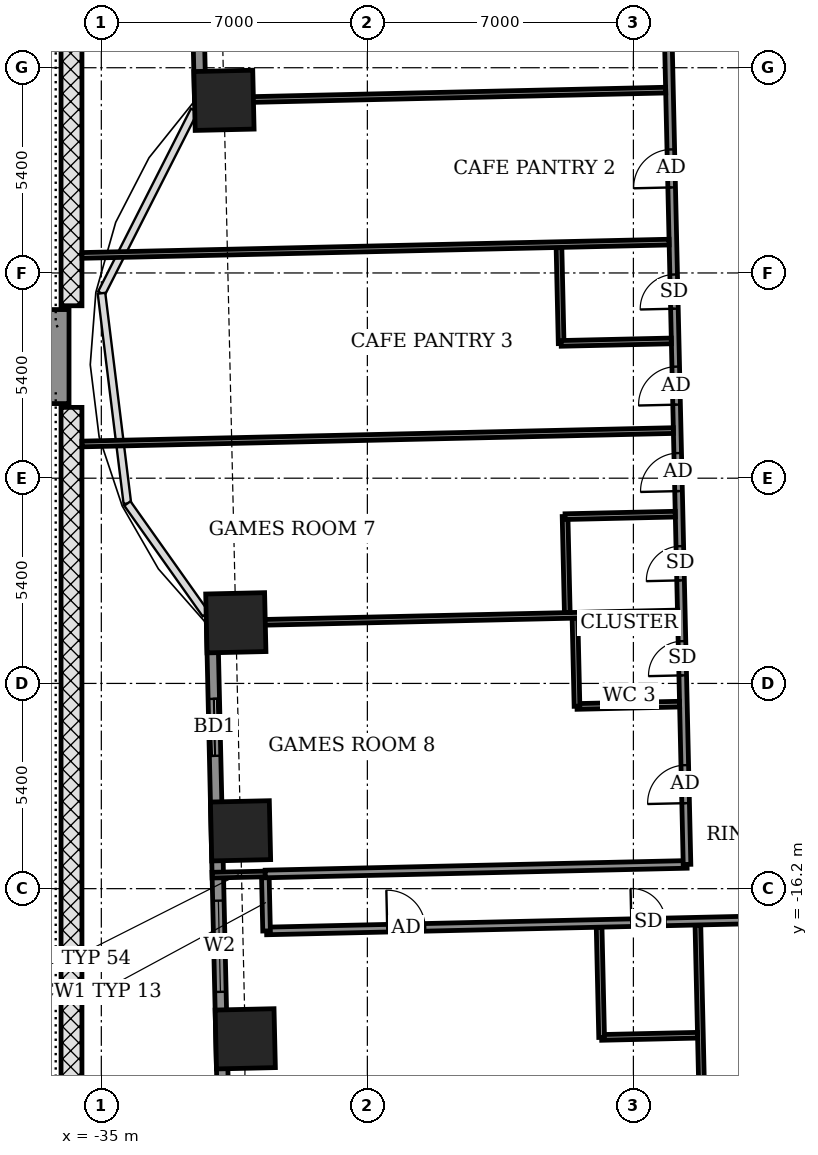
"""IFC4 building model, lengths in metres.
Left out: names, types, materials, properties, quantities, classifications, styles, units other than length and angle.
Written with IfcOpenShell. Run it as: python <this file> out.ifc"""

import sys

from ifc_helpers import new_model, si_unit, direction, frame, frame_2d, origin, origin_2d, place, context, subcontext, project, spatial, rectangle, extrude, element, fill, save


model = new_model("IFC4")
c1 = context("Model", 3, precision=1e-05, world=origin(), true_north=direction((0.0, 1.0)))
c2 = subcontext(c1, "Body", "Model", "MODEL_VIEW")
j1 = project(units=[si_unit("LENGTHUNIT", "METRE"), si_unit("PLANEANGLEUNIT", "RADIAN")], contexts=[c1])
p1 = place(None, origin())
s1 = spatial("IfcSite", under=j1, at=p1, CompositionType="ELEMENT")
p2 = place(p1, origin())
s2 = spatial("IfcBuilding", under=s1, at=p2, CompositionType="ELEMENT")
p3 = place(p2, frame((0.0, 0.0, 29.5)))
s3 = spatial("IfcBuildingStorey", under=s2, at=p3, CompositionType="ELEMENT", Elevation=29.5)
for number, where, z_axis, x_axis in (
    (1, (-31.461, -9.204, -0.55), (0.0, 0.0, 1.0), (0.023, -1.0, 0.0)),
    (2, (-31.337, -14.678, -0.55), (0.0, 0.0, 1.0), (0.023, -1.0, 0.0)),
    (3, (-31.213, -20.151, -0.55), (0.0, 0.0, 1.0), (0.023, -1.0, 0.0)),
    (4, (-31.773, 4.542, -0.55), (0.0, 0.0, 1.0), (0.023, -1.0, 0.0)),
):
    element("IfcColumn", number, at=place(p3, frame(where, z_axis=z_axis, x_axis=x_axis)), inside=s3, PredefinedType="COLUMN", context=c2, shape_type="SweptSolid", body=[
        extrude(rectangle(XDim=1.55, YDim=1.55, at=origin_2d()), origin(), (0.0, 0.0, 1.0), 4.6),
    ])
p4 = place(p3, frame((-32.758, 20.399, 0.0), z_axis=(0.0, 0.0, 1.0), x_axis=(0.022668485183, -0.999743036875, 0.0)))
e5 = element("IfcWall", 5, at=p4, inside=s3, PredefinedType="SOLIDWALL", context=c2, shape_type="SweptSolid", body=[
    extrude(rectangle(XDim=15.929, YDim=0.3, at=frame_2d((7.964, 0.0))), origin(), (0.0, 0.0, 1.0), 4.05),
])
p5 = place(p4, frame((2.183, 0.0, 0.0)))
e6 = element("IfcOpeningElement", 6, at=p5, cuts=e5, PredefinedType="OPENING", context=c2, shape_type="SweptSolid", body=[
    extrude(rectangle(XDim=1.5, YDim=2.4, at=frame_2d((0.75, 1.2))), frame((0.0, 0.16, 0.0), z_axis=(0.0, -1.0, 0.0), x_axis=(1.0, 0.0, 0.0)), (0.0, 0.0, 1.0), 0.32),
])
p6 = place(p4, frame((12.004, 0.0, 0.9)))
e7 = element("IfcOpeningElement", 7, at=p6, cuts=e5, PredefinedType="OPENING", context=c2, shape_type="SweptSolid", body=[
    extrude(rectangle(XDim=2.4, YDim=1.5, at=frame_2d((1.2, 0.75))), frame((0.0, 0.16, 0.0), z_axis=(0.0, -1.0, 0.0), x_axis=(1.0, 0.0, 0.0)), (0.0, 0.0, 1.0), 0.32),
])
p7 = place(p3, frame((-32.087, -9.164, 0.0), z_axis=(0.0, 0.0, 1.0), x_axis=(0.022651102902, -0.999743430855, 0.0)))
e8 = element("IfcWall", 8, at=p7, inside=s3, PredefinedType="SOLIDWALL", context=c2, shape_type="SweptSolid", body=[
    extrude(rectangle(XDim=16.329, YDim=0.3, at=frame_2d((8.165, 0.0))), origin(), (0.0, 0.0, 1.0), 4.05),
])
p8 = place(p7, frame((2.042, 0.0, 0.0)))
e9 = element("IfcOpeningElement", 9, at=p8, cuts=e8, PredefinedType="OPENING", context=c2, shape_type="SweptSolid", body=[
    extrude(rectangle(XDim=1.5, YDim=2.4, at=frame_2d((0.75, 1.2))), frame((0.0, 0.16, 0.0), z_axis=(0.0, -1.0, 0.0), x_axis=(1.0, 0.0, 0.0)), (0.0, 0.0, 1.0), 0.32),
])
p9 = place(p7, frame((7.354, 0.0, 0.9)))
e10 = element("IfcOpeningElement", 10, at=p9, cuts=e8, PredefinedType="OPENING", context=c2, shape_type="SweptSolid", body=[
    extrude(rectangle(XDim=2.4, YDim=1.5, at=frame_2d((1.2, 0.75))), frame((0.0, 0.16, 0.0), z_axis=(0.0, -1.0, 0.0), x_axis=(1.0, 0.0, 0.0)), (0.0, 0.0, 1.0), 0.32),
])
p10 = place(p3, frame((-33.464, -12.375, 0.0), z_axis=(0.0, 0.0, 1.0), x_axis=(-0.022929749512, 0.99973707873, 0.0)))
e11 = element("IfcWall", 11, at=p10, inside=s3, PredefinedType="USERDEFINED", context=c2, shape_type="SweptSolid", body=[
    extrude(rectangle(XDim=2.875, YDim=0.55, at=frame_2d((1.438, 0.0))), origin(), (0.0, 0.0, 1.0), 0.8),
])
p11 = place(p3, frame((-35.785, -22.443, 0.0), z_axis=(0.0, 0.0, 1.0), x_axis=(0.0, 1.0, 0.0)))
e12 = element("IfcWall", 12, at=p11, inside=s3, PredefinedType="USERDEFINED", context=c2, shape_type="SweptSolid", body=[
    extrude(rectangle(XDim=18.906, YDim=0.55, at=frame_2d((9.453, 0.0))), origin(), (0.0, 0.0, 1.0), 0.8),
])
p12 = place(p3, frame((-35.785, -0.863, 0.0), z_axis=(0.0, 0.0, 1.0), x_axis=(0.0, 1.0, 0.0)))
e13 = element("IfcWall", 13, at=p12, inside=s3, PredefinedType="USERDEFINED", context=c2, shape_type="SweptSolid", body=[
    extrude(rectangle(XDim=23.306, YDim=0.55, at=frame_2d((11.653, 0.0))), origin(), (0.0, 0.0, 1.0), 0.8),
])
p13 = place(p3, frame((-36.2, -0.963, 0.0), z_axis=(0.0, 0.0, 1.0), x_axis=(0.0, -1.0, 0.0)))
e14 = element("IfcWall", 14, at=p13, inside=s3, PredefinedType="STANDARD", context=c2, shape_type="SweptSolid", body=[
    extrude(rectangle(XDim=2.474, YDim=0.7, at=frame_2d((1.237, 0.0))), origin(), (0.0, 0.0, 1.0), 0.55),
])
p14 = place(p3, frame((-19.021, -29.552, 0.0), z_axis=(0.0, 0.0, 1.0), x_axis=(-0.022741979748, 0.999741367733, 0.0)))
e15 = element("IfcWall", 15, at=p14, inside=s3, PredefinedType="PARTITIONING", context=c2, shape_type="SweptSolid", body=[
    extrude(rectangle(XDim=12.399, YDim=0.15, at=frame_2d((6.2, 0.0))), origin(), (0.0, 0.0, 1.0), 3.55),
])
p15 = place(p3, frame((-21.836, -20.114, 0.0), z_axis=(0.0, 0.0, 1.0), x_axis=(0.99974392816, 0.022629142889, 0.0)))
e16 = element("IfcWall", 16, at=p15, inside=s3, PredefinedType="PARTITIONING", context=c2, shape_type="SweptSolid", body=[
    extrude(rectangle(XDim=2.525, YDim=0.15, at=frame_2d((1.262, 0.0))), origin(), (0.0, 0.0, 1.0), 4.05),
])
p16 = place(p3, frame((-21.836, -20.114, 0.0), z_axis=(0.0, 0.0, 1.0), x_axis=(-0.022817032779, 0.999739657619, 0.0)))
e17 = element("IfcWall", 17, at=p16, inside=s3, PredefinedType="PARTITIONING", context=c2, shape_type="SweptSolid", body=[
    extrude(rectangle(XDim=2.9, YDim=0.15, at=frame_2d((1.45, 0.0))), origin(), (0.0, 0.0, 1.0), 4.05),
])
p17 = place(p3, frame((-30.652, -17.313, 0.0), z_axis=(0.0, 0.0, 1.0), x_axis=(0.999742623764, 0.02268669719, 0.0)))
e18 = element("IfcWall", 18, at=p17, inside=s3, PredefinedType="PARTITIONING", context=c2, shape_type="SweptSolid", body=[
    extrude(rectangle(XDim=58.8, YDim=0.2, at=frame_2d((29.4, 0.0))), origin(), (0.0, 0.0, 1.0), 4.05),
])
p18 = place(p17, frame((3.175, 0.0, 0.0)))
e19 = element("IfcOpeningElement", 19, at=p18, cuts=e18, PredefinedType="OPENING", context=c2, shape_type="SweptSolid", body=[
    extrude(rectangle(XDim=1.0, YDim=2.1, at=frame_2d((0.5, 1.05))), frame((0.0, 0.11, 0.0), z_axis=(0.0, -1.0, 0.0), x_axis=(1.0, 0.0, 0.0)), (0.0, 0.0, 1.0), 0.22),
])
p19 = place(p17, frame((9.6, 0.0, 0.0)))
e20 = element("IfcOpeningElement", 20, at=p19, cuts=e18, PredefinedType="OPENING", context=c2, shape_type="SweptSolid", body=[
    extrude(rectangle(XDim=0.9, YDim=2.1, at=frame_2d((0.45, 1.05))), frame((0.0, 0.11, 0.0), z_axis=(0.0, -1.0, 0.0), x_axis=(1.0, 0.0, 0.0)), (0.0, 0.0, 1.0), 0.22),
])
p20 = place(p17, frame((14.675, 0.0, 0.0)))
e21 = element("IfcOpeningElement", 21, at=p20, cuts=e18, PredefinedType="OPENING", context=c2, shape_type="SweptSolid", body=[
    extrude(rectangle(XDim=1.0, YDim=2.1, at=frame_2d((0.5, 1.05))), frame((0.0, 0.11, 0.0), z_axis=(0.0, -1.0, 0.0), x_axis=(1.0, 0.0, 0.0)), (0.0, 0.0, 1.0), 0.22),
])
p21 = place(p17, frame((19.85, 0.0, 0.0)))
e22 = element("IfcOpeningElement", 22, at=p21, cuts=e18, PredefinedType="OPENING", context=c2, shape_type="SweptSolid", body=[
    extrude(rectangle(XDim=0.9, YDim=2.1, at=frame_2d((0.45, 1.05))), frame((0.0, 0.11, 0.0), z_axis=(0.0, -1.0, 0.0), x_axis=(1.0, 0.0, 0.0)), (0.0, 0.0, 1.0), 0.22),
])
p22 = place(p17, frame((27.25, 0.0, 0.0)))
e23 = element("IfcOpeningElement", 23, at=p22, cuts=e18, PredefinedType="OPENING", context=c2, shape_type="SweptSolid", body=[
    extrude(rectangle(XDim=0.9, YDim=2.1, at=frame_2d((0.45, 1.05))), frame((0.0, 0.11, 0.0), z_axis=(0.0, -1.0, 0.0), x_axis=(1.0, 0.0, 0.0)), (0.0, 0.0, 1.0), 0.22),
])
p23 = place(p17, frame((29.85, 0.0, 0.0)))
e24 = element("IfcOpeningElement", 24, at=p23, cuts=e18, PredefinedType="OPENING", context=c2, shape_type="SweptSolid", body=[
    extrude(rectangle(XDim=0.9, YDim=2.1, at=frame_2d((0.45, 1.05))), frame((0.0, 0.11, 0.0), z_axis=(0.0, -1.0, 0.0), x_axis=(1.0, 0.0, 0.0)), (0.0, 0.0, 1.0), 0.22),
])
p24 = place(p17, frame((37.275, 0.0, 0.0)))
e25 = element("IfcOpeningElement", 25, at=p24, cuts=e18, PredefinedType="OPENING", context=c2, shape_type="SweptSolid", body=[
    extrude(rectangle(XDim=0.9, YDim=2.1, at=frame_2d((0.45, 1.05))), frame((0.0, 0.11, 0.0), z_axis=(0.0, -1.0, 0.0), x_axis=(1.0, 0.0, 0.0)), (0.0, 0.0, 1.0), 0.22),
])
p25 = place(p17, frame((41.625, 0.0, 0.0)))
e26 = element("IfcOpeningElement", 26, at=p25, cuts=e18, PredefinedType="OPENING", context=c2, shape_type="SweptSolid", body=[
    extrude(rectangle(XDim=1.0, YDim=2.1, at=frame_2d((0.5, 1.05))), frame((0.0, 0.11, 0.0), z_axis=(0.0, -1.0, 0.0), x_axis=(1.0, 0.0, 0.0)), (0.0, 0.0, 1.0), 0.22),
])
p26 = place(p17, frame((45.95, 0.0, 0.0)))
e27 = element("IfcOpeningElement", 27, at=p26, cuts=e18, PredefinedType="OPENING", context=c2, shape_type="SweptSolid", body=[
    extrude(rectangle(XDim=0.9, YDim=2.1, at=frame_2d((0.45, 1.05))), frame((0.0, 0.11, 0.0), z_axis=(0.0, -1.0, 0.0), x_axis=(1.0, 0.0, 0.0)), (0.0, 0.0, 1.0), 0.22),
])
p27 = place(p17, frame((52.782, 0.0, 0.0)))
e28 = element("IfcOpeningElement", 28, at=p27, cuts=e18, PredefinedType="OPENING", context=c2, shape_type="SweptSolid", body=[
    extrude(rectangle(XDim=1.0, YDim=2.1, at=frame_2d((0.5, 1.05))), frame((0.0, 0.11, 0.0), z_axis=(0.0, -1.0, 0.0), x_axis=(1.0, 0.0, 0.0)), (0.0, 0.0, 1.0), 0.22),
])
p28 = place(p3, frame((-30.652, -17.313, 0.0), z_axis=(0.0, 0.0, 1.0), x_axis=(-0.022632637625, 0.99974384905, 0.0)))
e29 = element("IfcWall", 29, at=p28, inside=s3, PredefinedType="PARTITIONING", context=c2, shape_type="SweptSolid", body=[
    extrude(rectangle(XDim=1.5, YDim=0.2, at=frame_2d((0.75, 0.0))), origin(), (0.0, 0.0, 1.0), 4.05),
])
p29 = place(p3, frame((-32.086, -15.845, 0.0), z_axis=(0.0, 0.0, 1.0), x_axis=(0.999754810245, 0.022143156767, 0.0)))
e30 = element("IfcWall", 30, at=p29, inside=s3, PredefinedType="PARTITIONING", context=c2, shape_type="SweptSolid", body=[
    extrude(rectangle(XDim=1.4, YDim=0.15, at=frame_2d((0.7, 0.0))), origin(), (0.0, 0.0, 1.0), 3.55),
])
p30 = place(p3, frame((-30.686, -15.814, 0.0), z_axis=(0.0, 0.0, 1.0), x_axis=(0.999742346277, 0.022698921993, 0.0)))
e31 = element("IfcWall", 31, at=p30, inside=s3, PredefinedType="PARTITIONING", context=c2, shape_type="SweptSolid", body=[
    extrude(rectangle(XDim=11.1, YDim=0.2, at=frame_2d((5.55, 0.0))), origin(), (0.0, 0.0, 1.0), 4.05),
])
p31 = place(p3, frame((-19.589, -15.562, 0.0), z_axis=(0.0, 0.0, 1.0), x_axis=(-0.02267447203, 0.999742901109, 0.0)))
e32 = element("IfcWall", 32, at=p31, inside=s3, PredefinedType="PARTITIONING", context=c2, shape_type="SweptSolid", body=[
    extrude(rectangle(XDim=27.65, YDim=0.2, at=frame_2d((13.825, 0.0))), origin(), (0.0, 0.0, 1.0), 4.05),
])
p32 = place(p31, frame((22.313, 0.0, 0.0)))
e33 = element("IfcOpeningElement", 33, at=p32, cuts=e32, PredefinedType="OPENING", context=c2, shape_type="SweptSolid", body=[
    extrude(rectangle(XDim=1.0, YDim=2.1, at=frame_2d((0.5, 1.05))), frame((0.0, 0.11, 0.0), z_axis=(0.0, -1.0, 0.0), x_axis=(1.0, 0.0, 0.0)), (0.0, 0.0, 1.0), 0.22),
])
p33 = place(p31, frame((26.0, 0.0, 0.0)))
e34 = element("IfcOpeningElement", 34, at=p33, cuts=e32, PredefinedType="OPENING", context=c2, shape_type="SweptSolid", body=[
    extrude(rectangle(XDim=0.9, YDim=2.1, at=frame_2d((0.45, 1.05))), frame((0.0, 0.11, 0.0), z_axis=(0.0, -1.0, 0.0), x_axis=(1.0, 0.0, 0.0)), (0.0, 0.0, 1.0), 0.22),
])
p34 = place(p31, frame((17.817, 0.0, 0.0)))
e35 = element("IfcOpeningElement", 35, at=p34, cuts=e32, PredefinedType="OPENING", context=c2, shape_type="SweptSolid", body=[
    extrude(rectangle(XDim=1.0, YDim=2.1, at=frame_2d((0.5, 1.05))), frame((0.0, 0.11, 0.0), z_axis=(0.0, -1.0, 0.0), x_axis=(1.0, 0.0, 0.0)), (0.0, 0.0, 1.0), 0.22),
])
p35 = place(p31, frame((12.1, 0.0, 0.0)))
e36 = element("IfcOpeningElement", 36, at=p35, cuts=e32, PredefinedType="OPENING", context=c2, shape_type="SweptSolid", body=[
    extrude(rectangle(XDim=1.0, YDim=2.1, at=frame_2d((0.5, 1.05))), frame((0.0, 0.11, 0.0), z_axis=(0.0, -1.0, 0.0), x_axis=(1.0, 0.0, 0.0)), (0.0, 0.0, 1.0), 0.22),
])
p36 = place(p31, frame((14.625, 0.0, 0.0)))
e37 = element("IfcOpeningElement", 37, at=p36, cuts=e32, PredefinedType="OPENING", context=c2, shape_type="SweptSolid", body=[
    extrude(rectangle(XDim=0.9, YDim=2.1, at=frame_2d((0.45, 1.05))), frame((0.0, 0.11, 0.0), z_axis=(0.0, -1.0, 0.0), x_axis=(1.0, 0.0, 0.0)), (0.0, 0.0, 1.0), 0.22),
])
p37 = place(p31, frame((9.825, 0.0, 0.0)))
e38 = element("IfcOpeningElement", 38, at=p37, cuts=e32, PredefinedType="OPENING", context=c2, shape_type="SweptSolid", body=[
    extrude(rectangle(XDim=1.0, YDim=2.1, at=frame_2d((0.5, 1.05))), frame((0.0, 0.11, 0.0), z_axis=(0.0, -1.0, 0.0), x_axis=(1.0, 0.0, 0.0)), (0.0, 0.0, 1.0), 0.22),
])
p38 = place(p31, frame((7.475, 0.0, 0.0)))
e39 = element("IfcOpeningElement", 39, at=p38, cuts=e32, PredefinedType="OPENING", context=c2, shape_type="SweptSolid", body=[
    extrude(rectangle(XDim=0.9, YDim=2.1, at=frame_2d((0.45, 1.05))), frame((0.0, 0.11, 0.0), z_axis=(0.0, -1.0, 0.0), x_axis=(1.0, 0.0, 0.0)), (0.0, 0.0, 1.0), 0.22),
])
p39 = place(p31, frame((1.612, 0.0, 0.0)))
e40 = element("IfcOpeningElement", 40, at=p39, cuts=e32, PredefinedType="OPENING", context=c2, shape_type="SweptSolid", body=[
    extrude(rectangle(XDim=1.0, YDim=2.1, at=frame_2d((0.5, 1.05))), frame((0.0, 0.11, 0.0), z_axis=(0.0, -1.0, 0.0), x_axis=(1.0, 0.0, 0.0)), (0.0, 0.0, 1.0), 0.22),
])
p40 = place(p31, frame((4.975, 0.0, 0.0)))
e41 = element("IfcOpeningElement", 41, at=p40, cuts=e32, PredefinedType="OPENING", context=c2, shape_type="SweptSolid", body=[
    extrude(rectangle(XDim=0.9, YDim=2.1, at=frame_2d((0.45, 1.05))), frame((0.0, 0.11, 0.0), z_axis=(0.0, -1.0, 0.0), x_axis=(1.0, 0.0, 0.0)), (0.0, 0.0, 1.0), 0.22),
])
p41 = place(p3, frame((-22.484, -11.406, 0.0), z_axis=(0.0, 0.0, 1.0), x_axis=(0.999744396973, 0.02260842146, 0.0)))
e42 = element("IfcWall", 42, at=p41, inside=s3, PredefinedType="PARTITIONING", context=c2, shape_type="SweptSolid", body=[
    extrude(rectangle(XDim=2.7, YDim=0.15, at=frame_2d((1.35, 0.0))), origin(), (0.0, 0.0, 1.0), 4.05),
])
p42 = place(p3, frame((-22.484, -11.401, 0.0), z_axis=(0.0, 0.0, 1.0), x_axis=(-0.022895561926, 0.999737862264, 0.0)))
e43 = element("IfcWall", 43, at=p42, inside=s3, PredefinedType="PARTITIONING", context=c2, shape_type="SweptSolid", body=[
    extrude(rectangle(XDim=2.324, YDim=0.15, at=frame_2d((1.162, 0.0))), origin(), (0.0, 0.0, 1.0), 4.05),
])
p43 = place(p3, frame((-32.236, -9.227, 0.0), z_axis=(0.0, 0.0, 1.0), x_axis=(0.999743195783, 0.022661475803, 0.0)))
e44 = element("IfcWall", 44, at=p43, inside=s3, PredefinedType="PARTITIONING", context=c2, shape_type="SweptSolid", body=[
    extrude(rectangle(XDim=12.4, YDim=0.15, at=frame_2d((6.2, 0.0))), origin(), (0.0, 0.0, 1.0), 4.05),
])
p44 = place(p3, frame((-22.74, -8.931, 0.0), z_axis=(0.0, 0.0, 1.0), x_axis=(-0.023015762656, 0.999735102249, 0.0)))
e45 = element("IfcWall", 45, at=p44, inside=s3, PredefinedType="PARTITIONING", context=c2, shape_type="SweptSolid", body=[
    extrude(rectangle(XDim=2.525, YDim=0.15, at=frame_2d((1.262, 0.0))), origin(), (0.0, 0.0, 1.0), 4.05),
])
p45 = place(p3, frame((-22.797, -6.412, 0.0), z_axis=(0.0, 0.0, 1.0), x_axis=(0.999739701447, 0.022815112345, 0.0)))
e46 = element("IfcWall", 46, at=p45, inside=s3, PredefinedType="PARTITIONING", context=c2, shape_type="SweptSolid", body=[
    extrude(rectangle(XDim=2.9, YDim=0.15, at=frame_2d((1.45, 0.0))), origin(), (0.0, 0.0, 1.0), 4.05),
])
p46 = place(p3, frame((-35.51, -4.5, 0.0), z_axis=(0.0, 0.0, 1.0), x_axis=(0.999742790126, 0.022679364854, 0.0)))
e47 = element("IfcWall", 47, at=p46, inside=s3, PredefinedType="PARTITIONING", context=c2, shape_type="SweptSolid", body=[
    extrude(rectangle(XDim=15.566, YDim=0.15, at=frame_2d((7.783, 0.0))), origin(), (0.0, 0.0, 1.0), 0.93),
])
p47 = place(p3, frame((-22.901, -1.858, 0.0), z_axis=(0.0, 0.0, 1.0), x_axis=(-0.022629142889, 0.99974392816, 0.0)))
e48 = element("IfcWall", 48, at=p47, inside=s3, PredefinedType="PARTITIONING", context=c2, shape_type="SweptSolid", body=[
    extrude(rectangle(XDim=2.525, YDim=0.15, at=frame_2d((1.262, 0.0))), origin(), (0.0, 0.0, 1.0), 4.05),
])
p48 = place(p3, frame((-22.901, -1.853, 0.0), z_axis=(0.0, 0.0, 1.0), x_axis=(0.999749172145, 0.022396267458, 0.0)))
e49 = element("IfcWall", 49, at=p48, inside=s3, PredefinedType="PARTITIONING", context=c2, shape_type="SweptSolid", body=[
    extrude(rectangle(XDim=2.9, YDim=0.15, at=frame_2d((1.45, 0.0))), origin(), (0.0, 0.0, 1.0), 4.05),
])
p49 = place(p3, frame((-35.51, 0.461, 0.0), z_axis=(0.0, 0.0, 1.0), x_axis=(0.999741892637, 0.022718893181, 0.0)))
e50 = element("IfcWall", 50, at=p49, inside=s3, PredefinedType="PARTITIONING", context=c2, shape_type="SweptSolid", body=[
    extrude(rectangle(XDim=15.453, YDim=0.15, at=frame_2d((7.727, 0.0))), origin(), (0.0, 0.0, 1.0), 0.93),
])
p50 = place(p3, frame((-32.248, 4.536, 0.0), z_axis=(0.0, 0.0, 1.0), x_axis=(0.999741439573, 0.022738821441, 0.0)))
e51 = element("IfcWall", 51, at=p50, inside=s3, PredefinedType="PARTITIONING", context=c2, shape_type="SweptSolid", body=[
    extrude(rectangle(XDim=12.1, YDim=0.15, at=frame_2d((6.05, 0.0))), origin(), (0.0, 0.0, 1.0), 4.05),
])
p51 = place(p8, origin())
e52 = element("IfcDoor", 52, at=p51, inside=s3, OperationType="SLIDING_TO_LEFT", PredefinedType="DOOR", context=c2, shape_type="SweptSolid", body=[
    extrude(rectangle(XDim=1.5, YDim=2.4, at=frame_2d((0.75, 1.2))), frame((0.0, 0.025, 0.0), z_axis=(0.0, -1.0, 0.0), x_axis=(1.0, 0.0, 0.0)), (0.0, 0.0, 1.0), 0.05),
])
fill(e9, e52)
p52 = place(p9, origin())
e53 = element("IfcWindow", 53, at=p52, inside=s3, PartitioningType="DOUBLE_PANEL_VERTICAL", PredefinedType="WINDOW", context=c2, shape_type="SweptSolid", body=[
    extrude(rectangle(XDim=2.4, YDim=1.5, at=frame_2d((1.2, 0.75))), frame((0.0, 0.03, 0.0), z_axis=(0.0, -1.0, 0.0), x_axis=(1.0, 0.0, 0.0)), (0.0, 0.0, 1.0), 0.06),
])
fill(e10, e53)
p53 = place(p18, origin())
e54 = element("IfcDoor", 54, at=p53, inside=s3, OperationType="SINGLE_SWING_LEFT", PredefinedType="DOOR", context=c2, shape_type="SweptSolid", body=[
    extrude(rectangle(XDim=1.0, YDim=2.1, at=frame_2d((0.5, 1.05))), frame((0.0, 0.025, 0.0), z_axis=(0.0, -1.0, 0.0), x_axis=(1.0, 0.0, 0.0)), (0.0, 0.0, 1.0), 0.05),
])
fill(e19, e54)
p54 = place(p19, origin())
e55 = element("IfcDoor", 55, at=p54, inside=s3, OperationType="SINGLE_SWING_LEFT", PredefinedType="DOOR", context=c2, shape_type="SweptSolid", body=[
    extrude(rectangle(XDim=0.9, YDim=2.1, at=frame_2d((0.45, 1.05))), frame((0.0, 0.025, 0.0), z_axis=(0.0, -1.0, 0.0), x_axis=(1.0, 0.0, 0.0)), (0.0, 0.0, 1.0), 0.05),
])
fill(e20, e55)
p55 = place(p34, origin())
e56 = element("IfcDoor", 56, at=p55, inside=s3, OperationType="SINGLE_SWING_RIGHT", PredefinedType="DOOR", context=c2, shape_type="SweptSolid", body=[
    extrude(rectangle(XDim=1.0, YDim=2.1, at=frame_2d((0.5, 1.05))), frame((0.0, 0.025, 0.0), z_axis=(0.0, -1.0, 0.0), x_axis=(1.0, 0.0, 0.0)), (0.0, 0.0, 1.0), 0.05),
])
fill(e35, e56)
p56 = place(p35, origin())
e57 = element("IfcDoor", 57, at=p56, inside=s3, OperationType="SINGLE_SWING_LEFT", PredefinedType="DOOR", context=c2, shape_type="SweptSolid", body=[
    extrude(rectangle(XDim=1.0, YDim=2.1, at=frame_2d((0.5, 1.05))), frame((0.0, 0.025, 0.0), z_axis=(0.0, -1.0, 0.0), x_axis=(1.0, 0.0, 0.0)), (0.0, 0.0, 1.0), 0.05),
])
fill(e36, e57)
p57 = place(p36, origin())
e58 = element("IfcDoor", 58, at=p57, inside=s3, OperationType="SINGLE_SWING_RIGHT", PredefinedType="DOOR", context=c2, shape_type="SweptSolid", body=[
    extrude(rectangle(XDim=0.9, YDim=2.1, at=frame_2d((0.45, 1.05))), frame((0.0, 0.025, 0.0), z_axis=(0.0, -1.0, 0.0), x_axis=(1.0, 0.0, 0.0)), (0.0, 0.0, 1.0), 0.05),
])
fill(e37, e58)
p58 = place(p37, origin())
e59 = element("IfcDoor", 59, at=p58, inside=s3, OperationType="SINGLE_SWING_RIGHT", PredefinedType="DOOR", context=c2, shape_type="SweptSolid", body=[
    extrude(rectangle(XDim=1.0, YDim=2.1, at=frame_2d((0.5, 1.05))), frame((0.0, 0.025, 0.0), z_axis=(0.0, -1.0, 0.0), x_axis=(1.0, 0.0, 0.0)), (0.0, 0.0, 1.0), 0.05),
])
fill(e38, e59)
p59 = place(p38, origin())
e60 = element("IfcDoor", 60, at=p59, inside=s3, OperationType="SINGLE_SWING_LEFT", PredefinedType="DOOR", context=c2, shape_type="SweptSolid", body=[
    extrude(rectangle(XDim=0.9, YDim=2.1, at=frame_2d((0.45, 1.05))), frame((0.0, 0.025, 0.0), z_axis=(0.0, -1.0, 0.0), x_axis=(1.0, 0.0, 0.0)), (0.0, 0.0, 1.0), 0.05),
])
fill(e39, e60)
p60 = place(p39, origin())
e61 = element("IfcDoor", 61, at=p60, inside=s3, OperationType="SINGLE_SWING_LEFT", PredefinedType="DOOR", context=c2, shape_type="SweptSolid", body=[
    extrude(rectangle(XDim=1.0, YDim=2.1, at=frame_2d((0.5, 1.05))), frame((0.0, 0.025, 0.0), z_axis=(0.0, -1.0, 0.0), x_axis=(1.0, 0.0, 0.0)), (0.0, 0.0, 1.0), 0.05),
])
fill(e40, e61)
p61 = place(p40, origin())
e62 = element("IfcDoor", 62, at=p61, inside=s3, OperationType="SINGLE_SWING_RIGHT", PredefinedType="DOOR", context=c2, shape_type="SweptSolid", body=[
    extrude(rectangle(XDim=0.9, YDim=2.1, at=frame_2d((0.45, 1.05))), frame((0.0, 0.025, 0.0), z_axis=(0.0, -1.0, 0.0), x_axis=(1.0, 0.0, 0.0)), (0.0, 0.0, 1.0), 0.05),
])
fill(e41, e62)
save(model, sys.argv[1])
